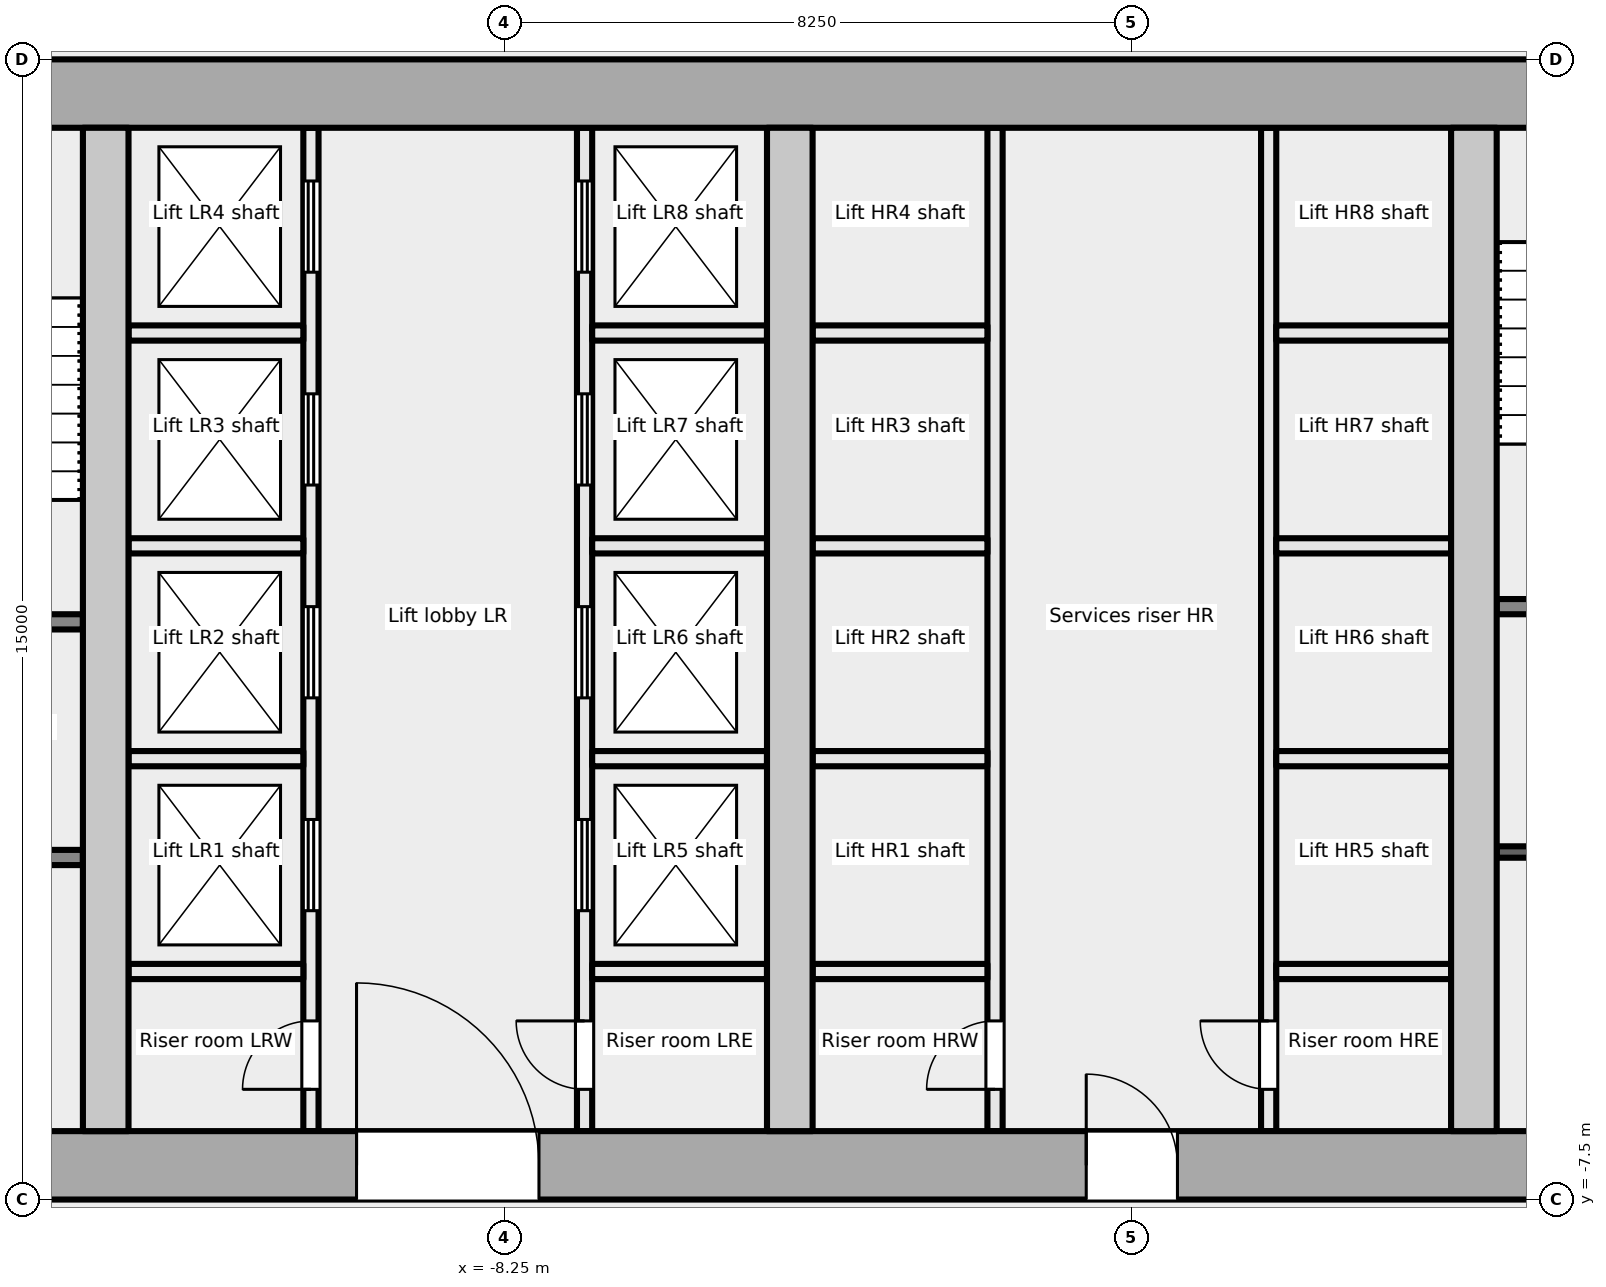
"""IFC4 building model, lengths in metres.
Left out: names, types, materials, properties, quantities, classifications, styles, units other than length and angle.
Written with IfcOpenShell. Run it as: python <this file> out.ifc"""

import sys

from ifc_helpers import new_model, si_unit, direction, frame, frame_2d, origin, place, context, subcontext, project, spatial, rectangle, extrude, element, fill, save


model = new_model("IFC4")
c1 = context("Model", 3, precision=1e-05, world=origin(), true_north=direction((0.0, 1.0)))
c2 = subcontext(c1, "Body", "Model", "MODEL_VIEW")
j1 = project(units=[si_unit("LENGTHUNIT", "METRE"), si_unit("PLANEANGLEUNIT", "RADIAN")], contexts=[c1])
p1 = place(None, origin())
s1 = spatial("IfcSite", under=j1, at=p1, CompositionType="ELEMENT")
p2 = place(p1, origin())
s2 = spatial("IfcBuilding", under=s1, at=p2, CompositionType="ELEMENT")
p3 = place(p2, frame((0.0, 0.0, 74.3)))
s3 = spatial("IfcBuildingStorey", under=s2, at=p3, CompositionType="ELEMENT", Elevation=74.3)
p4 = place(p3, frame((-18.0, -7.05, -0.2), z_axis=(0.0, 0.0, 1.0), x_axis=(1.0, 0.0, 0.0)))
e1 = element("IfcWall", 1, at=p4, inside=s3, PredefinedType="SHEAR", context=c2, shape_type="SweptSolid", body=[
    extrude(rectangle(XDim=36.0, YDim=0.9, at=frame_2d((18.0, 0.0))), origin(), (0.0, 0.0, 1.0), 5.4),
])
p5 = place(p4, frame((7.8, 0.0, 0.2)))
e2 = element("IfcOpeningElement", 2, at=p5, cuts=e1, PredefinedType="OPENING", context=c2, shape_type="SweptSolid", body=[
    extrude(rectangle(XDim=2.4, YDim=2.1, at=frame_2d((1.2, 1.05))), frame((0.0, 0.46, 0.0), z_axis=(0.0, -1.0, 0.0), x_axis=(1.0, 0.0, 0.0)), (0.0, 0.0, 1.0), 0.921),
])
p6 = place(p4, frame((17.4, 0.0, 0.2)))
e3 = element("IfcOpeningElement", 3, at=p6, cuts=e1, PredefinedType="OPENING", context=c2, shape_type="SweptSolid", body=[
    extrude(rectangle(XDim=1.2, YDim=2.1, at=frame_2d((0.6, 1.05))), frame((0.0, 0.46, 0.0), z_axis=(0.0, -1.0, 0.0), x_axis=(1.0, 0.0, 0.0)), (0.0, 0.0, 1.0), 0.921),
])
p7 = place(p4, frame((26.1, 0.0, 0.2)))
e4 = element("IfcOpeningElement", 4, at=p7, cuts=e1, PredefinedType="OPENING", context=c2, shape_type="SweptSolid", body=[
    extrude(rectangle(XDim=2.4, YDim=2.1, at=frame_2d((1.2, 1.05))), frame((0.0, 0.46, 0.0), z_axis=(0.0, -1.0, 0.0), x_axis=(1.0, 0.0, 0.0)), (0.0, 0.0, 1.0), 0.921),
])
p8 = place(p3, frame((-18.0, 7.05, -0.2), z_axis=(0.0, 0.0, 1.0), x_axis=(1.0, 0.0, 0.0)))
e5 = element("IfcWall", 5, at=p8, inside=s3, PredefinedType="SHEAR", context=c2, shape_type="SweptSolid", body=[
    extrude(rectangle(XDim=36.0, YDim=0.9, at=frame_2d((18.0, 0.0))), origin(), (0.0, 0.0, 1.0), 5.4),
])
for number, where, z_axis, x_axis in (
    (6, (-13.5, -6.6, -0.2), (0.0, 0.0, 1.0), (0.0, 1.0, 0.0)),
    (7, (-4.5, -6.6, -0.2), (0.0, 0.0, 1.0), (0.0, 1.0, 0.0)),
    (8, (4.5, -6.6, -0.2), (0.0, 0.0, 1.0), (0.0, 1.0, 0.0)),
):
    element("IfcWall", number, at=place(p3, frame(where, z_axis=z_axis, x_axis=x_axis)), inside=s3, PredefinedType="SHEAR", context=c2, shape_type="SweptSolid", body=[
        extrude(rectangle(XDim=13.2, YDim=0.6, at=frame_2d((6.6, 0.0))), origin(), (0.0, 0.0, 1.0), 5.4),
    ])
p9 = place(p3, frame((-17.1, -3.0, 0.0), z_axis=(0.0, 0.0, 1.0), x_axis=(1.0, 0.0, 0.0)))
e9 = element("IfcWall", 9, at=p9, inside=s3, PredefinedType="PARTITIONING", context=c2, shape_type="SweptSolid", body=[
    extrude(rectangle(XDim=3.3, YDim=0.2, at=frame_2d((1.65, 0.0))), origin(), (0.0, 0.0, 1.0), 5.2),
])
p10 = place(p9, frame((1.1, 0.0, 0.0)))
e10 = element("IfcOpeningElement", 10, at=p10, cuts=e9, PredefinedType="OPENING", context=c2, shape_type="SweptSolid", body=[
    extrude(rectangle(XDim=1.1, YDim=2.1, at=frame_2d((0.55, 1.05))), frame((0.0, 0.111, 0.0), z_axis=(0.0, -1.0, 0.0), x_axis=(1.0, 0.0, 0.0)), (0.0, 0.0, 1.0), 0.221),
])
p11 = place(p3, frame((-17.1, 0.1, 0.0), z_axis=(0.0, 0.0, 1.0), x_axis=(1.0, 0.0, 0.0)))
e11 = element("IfcWall", 11, at=p11, inside=s3, PredefinedType="PARTITIONING", context=c2, shape_type="SweptSolid", body=[
    extrude(rectangle(XDim=3.3, YDim=0.2, at=frame_2d((1.65, 0.0))), origin(), (0.0, 0.0, 1.0), 5.2),
])
p12 = place(p11, frame((1.1, 0.0, 0.0)))
e12 = element("IfcOpeningElement", 12, at=p12, cuts=e11, PredefinedType="OPENING", context=c2, shape_type="SweptSolid", body=[
    extrude(rectangle(XDim=1.1, YDim=2.1, at=frame_2d((0.55, 1.05))), frame((0.0, 0.111, 0.0), z_axis=(0.0, -1.0, 0.0), x_axis=(1.0, 0.0, 0.0)), (0.0, 0.0, 1.0), 0.221),
])
p13 = place(p3, frame((-10.8, -6.6, 0.0), z_axis=(0.0, 0.0, 1.0), x_axis=(0.0, 1.0, 0.0)))
e13 = element("IfcWall", 13, at=p13, inside=s3, PredefinedType="PARTITIONING", context=c2, shape_type="SweptSolid", body=[
    extrude(rectangle(XDim=13.2, YDim=0.2, at=frame_2d((6.6, 0.0))), origin(), (0.0, 0.0, 1.0), 5.2),
])
p14 = place(p13, frame((0.55, 0.0, 0.0)))
e14 = element("IfcOpeningElement", 14, at=p14, cuts=e13, PredefinedType="OPENING", context=c2, shape_type="SweptSolid", body=[
    extrude(rectangle(XDim=0.9, YDim=2.1, at=frame_2d((0.45, 1.05))), frame((0.0, 0.111, 0.0), z_axis=(0.0, -1.0, 0.0), x_axis=(1.0, 0.0, 0.0)), (0.0, 0.0, 1.0), 0.221),
])
p15 = place(p13, frame((2.9, 0.0, 0.0)))
e15 = element("IfcOpeningElement", 15, at=p15, cuts=e13, PredefinedType="OPENING", context=c2, shape_type="SweptSolid", body=[
    extrude(rectangle(XDim=1.2, YDim=2.1, at=frame_2d((0.6, 1.05))), frame((0.0, 0.111, 0.0), z_axis=(0.0, -1.0, 0.0), x_axis=(1.0, 0.0, 0.0)), (0.0, 0.0, 1.0), 0.221),
])
p16 = place(p13, frame((5.7, 0.0, 0.0)))
e16 = element("IfcOpeningElement", 16, at=p16, cuts=e13, PredefinedType="OPENING", context=c2, shape_type="SweptSolid", body=[
    extrude(rectangle(XDim=1.2, YDim=2.1, at=frame_2d((0.6, 1.05))), frame((0.0, 0.111, 0.0), z_axis=(0.0, -1.0, 0.0), x_axis=(1.0, 0.0, 0.0)), (0.0, 0.0, 1.0), 0.221),
])
p17 = place(p13, frame((8.5, 0.0, 0.0)))
e17 = element("IfcOpeningElement", 17, at=p17, cuts=e13, PredefinedType="OPENING", context=c2, shape_type="SweptSolid", body=[
    extrude(rectangle(XDim=1.2, YDim=2.1, at=frame_2d((0.6, 1.05))), frame((0.0, 0.111, 0.0), z_axis=(0.0, -1.0, 0.0), x_axis=(1.0, 0.0, 0.0)), (0.0, 0.0, 1.0), 0.221),
])
p18 = place(p13, frame((11.3, 0.0, 0.0)))
e18 = element("IfcOpeningElement", 18, at=p18, cuts=e13, PredefinedType="OPENING", context=c2, shape_type="SweptSolid", body=[
    extrude(rectangle(XDim=1.2, YDim=2.1, at=frame_2d((0.6, 1.05))), frame((0.0, 0.111, 0.0), z_axis=(0.0, -1.0, 0.0), x_axis=(1.0, 0.0, 0.0)), (0.0, 0.0, 1.0), 0.221),
])
p19 = place(p3, frame((-7.2, -6.6, 0.0), z_axis=(0.0, 0.0, 1.0), x_axis=(0.0, 1.0, 0.0)))
e19 = element("IfcWall", 19, at=p19, inside=s3, PredefinedType="PARTITIONING", context=c2, shape_type="SweptSolid", body=[
    extrude(rectangle(XDim=13.2, YDim=0.2, at=frame_2d((6.6, 0.0))), origin(), (0.0, 0.0, 1.0), 5.2),
])
p20 = place(p19, frame((0.55, 0.0, 0.0)))
e20 = element("IfcOpeningElement", 20, at=p20, cuts=e19, PredefinedType="OPENING", context=c2, shape_type="SweptSolid", body=[
    extrude(rectangle(XDim=0.9, YDim=2.1, at=frame_2d((0.45, 1.05))), frame((0.0, 0.111, 0.0), z_axis=(0.0, -1.0, 0.0), x_axis=(1.0, 0.0, 0.0)), (0.0, 0.0, 1.0), 0.221),
])
p21 = place(p19, frame((2.9, 0.0, 0.0)))
e21 = element("IfcOpeningElement", 21, at=p21, cuts=e19, PredefinedType="OPENING", context=c2, shape_type="SweptSolid", body=[
    extrude(rectangle(XDim=1.2, YDim=2.1, at=frame_2d((0.6, 1.05))), frame((0.0, 0.111, 0.0), z_axis=(0.0, -1.0, 0.0), x_axis=(1.0, 0.0, 0.0)), (0.0, 0.0, 1.0), 0.221),
])
p22 = place(p19, frame((5.7, 0.0, 0.0)))
e22 = element("IfcOpeningElement", 22, at=p22, cuts=e19, PredefinedType="OPENING", context=c2, shape_type="SweptSolid", body=[
    extrude(rectangle(XDim=1.2, YDim=2.1, at=frame_2d((0.6, 1.05))), frame((0.0, 0.111, 0.0), z_axis=(0.0, -1.0, 0.0), x_axis=(1.0, 0.0, 0.0)), (0.0, 0.0, 1.0), 0.221),
])
p23 = place(p19, frame((8.5, 0.0, 0.0)))
e23 = element("IfcOpeningElement", 23, at=p23, cuts=e19, PredefinedType="OPENING", context=c2, shape_type="SweptSolid", body=[
    extrude(rectangle(XDim=1.2, YDim=2.1, at=frame_2d((0.6, 1.05))), frame((0.0, 0.111, 0.0), z_axis=(0.0, -1.0, 0.0), x_axis=(1.0, 0.0, 0.0)), (0.0, 0.0, 1.0), 0.221),
])
p24 = place(p19, frame((11.3, 0.0, 0.0)))
e24 = element("IfcOpeningElement", 24, at=p24, cuts=e19, PredefinedType="OPENING", context=c2, shape_type="SweptSolid", body=[
    extrude(rectangle(XDim=1.2, YDim=2.1, at=frame_2d((0.6, 1.05))), frame((0.0, 0.111, 0.0), z_axis=(0.0, -1.0, 0.0), x_axis=(1.0, 0.0, 0.0)), (0.0, 0.0, 1.0), 0.221),
])
for number, where, z_axis, x_axis in (
    (25, (-13.2, -1.7, 0.0), (0.0, 0.0, 1.0), (1.0, 0.0, 0.0)),
    (26, (-13.2, 1.1, 0.0), (0.0, 0.0, 1.0), (1.0, 0.0, 0.0)),
    (27, (-13.2, 3.9, 0.0), (0.0, 0.0, 1.0), (1.0, 0.0, 0.0)),
    (28, (-13.2, -4.5, 0.0), (0.0, 0.0, 1.0), (1.0, 0.0, 0.0)),
    (29, (-7.1, -1.7, 0.0), (0.0, 0.0, 1.0), (1.0, 0.0, 0.0)),
    (30, (-7.1, 1.1, 0.0), (0.0, 0.0, 1.0), (1.0, 0.0, 0.0)),
    (31, (-7.1, 3.9, 0.0), (0.0, 0.0, 1.0), (1.0, 0.0, 0.0)),
    (32, (-7.1, -4.5, 0.0), (0.0, 0.0, 1.0), (1.0, 0.0, 0.0)),
):
    element("IfcWall", number, at=place(p3, frame(where, z_axis=z_axis, x_axis=x_axis)), inside=s3, PredefinedType="PARTITIONING", context=c2, shape_type="SweptSolid", body=[
        extrude(rectangle(XDim=2.3, YDim=0.2, at=frame_2d((1.15, 0.0))), origin(), (0.0, 0.0, 1.0), 5.2),
    ])
p25 = place(p3, frame((-1.8, -6.6, 0.0), z_axis=(0.0, 0.0, 1.0), x_axis=(0.0, 1.0, 0.0)))
e33 = element("IfcWall", 33, at=p25, inside=s3, PredefinedType="PARTITIONING", context=c2, shape_type="SweptSolid", body=[
    extrude(rectangle(XDim=13.2, YDim=0.2, at=frame_2d((6.6, 0.0))), origin(), (0.0, 0.0, 1.0), 5.2),
])
p26 = place(p25, frame((0.55, 0.0, 0.0)))
e34 = element("IfcOpeningElement", 34, at=p26, cuts=e33, PredefinedType="OPENING", context=c2, shape_type="SweptSolid", body=[
    extrude(rectangle(XDim=0.9, YDim=2.1, at=frame_2d((0.45, 1.05))), frame((0.0, 0.111, 0.0), z_axis=(0.0, -1.0, 0.0), x_axis=(1.0, 0.0, 0.0)), (0.0, 0.0, 1.0), 0.221),
])
p27 = place(p3, frame((1.8, -6.6, 0.0), z_axis=(0.0, 0.0, 1.0), x_axis=(0.0, 1.0, 0.0)))
e35 = element("IfcWall", 35, at=p27, inside=s3, PredefinedType="PARTITIONING", context=c2, shape_type="SweptSolid", body=[
    extrude(rectangle(XDim=13.2, YDim=0.2, at=frame_2d((6.6, 0.0))), origin(), (0.0, 0.0, 1.0), 5.2),
])
p28 = place(p27, frame((0.55, 0.0, 0.0)))
e36 = element("IfcOpeningElement", 36, at=p28, cuts=e35, PredefinedType="OPENING", context=c2, shape_type="SweptSolid", body=[
    extrude(rectangle(XDim=0.9, YDim=2.1, at=frame_2d((0.45, 1.05))), frame((0.0, 0.111, 0.0), z_axis=(0.0, -1.0, 0.0), x_axis=(1.0, 0.0, 0.0)), (0.0, 0.0, 1.0), 0.221),
])
for number, where, z_axis, x_axis in (
    (37, (-4.2, -1.7, 0.0), (0.0, 0.0, 1.0), (1.0, 0.0, 0.0)),
    (38, (-4.2, 1.1, 0.0), (0.0, 0.0, 1.0), (1.0, 0.0, 0.0)),
    (39, (-4.2, 3.9, 0.0), (0.0, 0.0, 1.0), (1.0, 0.0, 0.0)),
    (40, (-4.2, -4.5, 0.0), (0.0, 0.0, 1.0), (1.0, 0.0, 0.0)),
    (41, (1.9, -1.7, 0.0), (0.0, 0.0, 1.0), (1.0, 0.0, 0.0)),
    (42, (1.9, 1.1, 0.0), (0.0, 0.0, 1.0), (1.0, 0.0, 0.0)),
    (43, (1.9, 3.9, 0.0), (0.0, 0.0, 1.0), (1.0, 0.0, 0.0)),
    (44, (1.9, -4.5, 0.0), (0.0, 0.0, 1.0), (1.0, 0.0, 0.0)),
):
    element("IfcWall", number, at=place(p3, frame(where, z_axis=z_axis, x_axis=x_axis)), inside=s3, PredefinedType="PARTITIONING", context=c2, shape_type="SweptSolid", body=[
        extrude(rectangle(XDim=2.3, YDim=0.2, at=frame_2d((1.15, 0.0))), origin(), (0.0, 0.0, 1.0), 5.2),
    ])
p29 = place(p3, frame((4.8, 0.3, 0.0), z_axis=(0.0, 0.0, 1.0), x_axis=(1.0, 0.0, 0.0)))
e45 = element("IfcWall", 45, at=p29, inside=s3, PredefinedType="PARTITIONING", context=c2, shape_type="SweptSolid", body=[
    extrude(rectangle(XDim=3.15, YDim=0.2, at=frame_2d((1.575, 0.0))), origin(), (0.0, 0.0, 1.0), 5.2),
])
p30 = place(p3, frame((4.8, -2.928, 0.0), z_axis=(0.0, 0.0, 1.0), x_axis=(1.0, 0.0, 0.0)))
e46 = element("IfcWall", 46, at=p30, inside=s3, PredefinedType="PARTITIONING", context=c2, shape_type="SweptSolid", body=[
    extrude(rectangle(XDim=3.15, YDim=0.15, at=frame_2d((1.575, 0.0))), origin(), (0.0, 0.0, 1.0), 5.2),
])
p31 = place(p14, origin())
e47 = element("IfcDoor", 47, at=p31, inside=s3, OperationType="SINGLE_SWING_LEFT", PredefinedType="DOOR", context=c2, shape_type="SweptSolid", body=[
    extrude(rectangle(XDim=0.9, YDim=2.1, at=frame_2d((0.45, 1.05))), frame((0.0, 0.025, 0.0), z_axis=(0.0, -1.0, 0.0), x_axis=(1.0, 0.0, 0.0)), (0.0, 0.0, 1.0), 0.05),
])
fill(e14, e47)
p32 = place(p15, origin())
e48 = element("IfcDoor", 48, at=p32, inside=s3, OperationType="DOUBLE_DOOR_SLIDING", PredefinedType="DOOR", context=c2, shape_type="SweptSolid", body=[
    extrude(rectangle(XDim=1.2, YDim=2.1, at=frame_2d((0.6, 1.05))), frame((0.0, 0.025, 0.0), z_axis=(0.0, -1.0, 0.0), x_axis=(1.0, 0.0, 0.0)), (0.0, 0.0, 1.0), 0.05),
])
fill(e15, e48)
p33 = place(p16, origin())
e49 = element("IfcDoor", 49, at=p33, inside=s3, OperationType="DOUBLE_DOOR_SLIDING", PredefinedType="DOOR", context=c2, shape_type="SweptSolid", body=[
    extrude(rectangle(XDim=1.2, YDim=2.1, at=frame_2d((0.6, 1.05))), frame((0.0, 0.025, 0.0), z_axis=(0.0, -1.0, 0.0), x_axis=(1.0, 0.0, 0.0)), (0.0, 0.0, 1.0), 0.05),
])
fill(e16, e49)
p34 = place(p17, origin())
e50 = element("IfcDoor", 50, at=p34, inside=s3, OperationType="DOUBLE_DOOR_SLIDING", PredefinedType="DOOR", context=c2, shape_type="SweptSolid", body=[
    extrude(rectangle(XDim=1.2, YDim=2.1, at=frame_2d((0.6, 1.05))), frame((0.0, 0.025, 0.0), z_axis=(0.0, -1.0, 0.0), x_axis=(1.0, 0.0, 0.0)), (0.0, 0.0, 1.0), 0.05),
])
fill(e17, e50)
p35 = place(p18, origin())
e51 = element("IfcDoor", 51, at=p35, inside=s3, OperationType="DOUBLE_DOOR_SLIDING", PredefinedType="DOOR", context=c2, shape_type="SweptSolid", body=[
    extrude(rectangle(XDim=1.2, YDim=2.1, at=frame_2d((0.6, 1.05))), frame((0.0, 0.025, 0.0), z_axis=(0.0, -1.0, 0.0), x_axis=(1.0, 0.0, 0.0)), (0.0, 0.0, 1.0), 0.05),
])
fill(e18, e51)
p36 = place(p20, origin())
e52 = element("IfcDoor", 52, at=p36, inside=s3, OperationType="SINGLE_SWING_RIGHT", PredefinedType="DOOR", context=c2, shape_type="SweptSolid", body=[
    extrude(rectangle(XDim=0.9, YDim=2.1, at=frame_2d((0.45, 1.05))), frame((0.0, 0.025, 0.0), z_axis=(0.0, -1.0, 0.0), x_axis=(1.0, 0.0, 0.0)), (0.0, 0.0, 1.0), 0.05),
])
fill(e20, e52)
p37 = place(p21, origin())
e53 = element("IfcDoor", 53, at=p37, inside=s3, OperationType="DOUBLE_DOOR_SLIDING", PredefinedType="DOOR", context=c2, shape_type="SweptSolid", body=[
    extrude(rectangle(XDim=1.2, YDim=2.1, at=frame_2d((0.6, 1.05))), frame((0.0, 0.025, 0.0), z_axis=(0.0, -1.0, 0.0), x_axis=(1.0, 0.0, 0.0)), (0.0, 0.0, 1.0), 0.05),
])
fill(e21, e53)
p38 = place(p22, origin())
e54 = element("IfcDoor", 54, at=p38, inside=s3, OperationType="DOUBLE_DOOR_SLIDING", PredefinedType="DOOR", context=c2, shape_type="SweptSolid", body=[
    extrude(rectangle(XDim=1.2, YDim=2.1, at=frame_2d((0.6, 1.05))), frame((0.0, 0.025, 0.0), z_axis=(0.0, -1.0, 0.0), x_axis=(1.0, 0.0, 0.0)), (0.0, 0.0, 1.0), 0.05),
])
fill(e22, e54)
p39 = place(p23, origin())
e55 = element("IfcDoor", 55, at=p39, inside=s3, OperationType="DOUBLE_DOOR_SLIDING", PredefinedType="DOOR", context=c2, shape_type="SweptSolid", body=[
    extrude(rectangle(XDim=1.2, YDim=2.1, at=frame_2d((0.6, 1.05))), frame((0.0, 0.025, 0.0), z_axis=(0.0, -1.0, 0.0), x_axis=(1.0, 0.0, 0.0)), (0.0, 0.0, 1.0), 0.05),
])
fill(e23, e55)
p40 = place(p24, origin())
e56 = element("IfcDoor", 56, at=p40, inside=s3, OperationType="DOUBLE_DOOR_SLIDING", PredefinedType="DOOR", context=c2, shape_type="SweptSolid", body=[
    extrude(rectangle(XDim=1.2, YDim=2.1, at=frame_2d((0.6, 1.05))), frame((0.0, 0.025, 0.0), z_axis=(0.0, -1.0, 0.0), x_axis=(1.0, 0.0, 0.0)), (0.0, 0.0, 1.0), 0.05),
])
fill(e24, e56)
p41 = place(p5, origin())
e57 = element("IfcDoor", 57, at=p41, inside=s3, OperationType="DOUBLE_DOOR_DOUBLE_SWING", PredefinedType="DOOR", context=c2, shape_type="SweptSolid", body=[
    extrude(rectangle(XDim=2.4, YDim=2.1, at=frame_2d((1.2, 1.05))), frame((0.0, 0.025, 0.0), z_axis=(0.0, -1.0, 0.0), x_axis=(1.0, 0.0, 0.0)), (0.0, 0.0, 1.0), 0.05),
])
fill(e2, e57)
p42 = place(p26, origin())
e58 = element("IfcDoor", 58, at=p42, inside=s3, OperationType="SINGLE_SWING_LEFT", PredefinedType="DOOR", context=c2, shape_type="SweptSolid", body=[
    extrude(rectangle(XDim=0.9, YDim=2.1, at=frame_2d((0.45, 1.05))), frame((0.0, 0.025, 0.0), z_axis=(0.0, -1.0, 0.0), x_axis=(1.0, 0.0, 0.0)), (0.0, 0.0, 1.0), 0.05),
])
fill(e34, e58)
p43 = place(p28, origin())
e59 = element("IfcDoor", 59, at=p43, inside=s3, OperationType="SINGLE_SWING_RIGHT", PredefinedType="DOOR", context=c2, shape_type="SweptSolid", body=[
    extrude(rectangle(XDim=0.9, YDim=2.1, at=frame_2d((0.45, 1.05))), frame((0.0, 0.025, 0.0), z_axis=(0.0, -1.0, 0.0), x_axis=(1.0, 0.0, 0.0)), (0.0, 0.0, 1.0), 0.05),
])
fill(e36, e59)
p44 = place(p6, origin())
e60 = element("IfcDoor", 60, at=p44, inside=s3, OperationType="SINGLE_SWING_LEFT", PredefinedType="DOOR", context=c2, shape_type="SweptSolid", body=[
    extrude(rectangle(XDim=1.2, YDim=2.1, at=frame_2d((0.6, 1.05))), frame((0.0, 0.025, 0.0), z_axis=(0.0, -1.0, 0.0), x_axis=(1.0, 0.0, 0.0)), (0.0, 0.0, 1.0), 0.05),
])
fill(e3, e60)
save(model, sys.argv[1])
